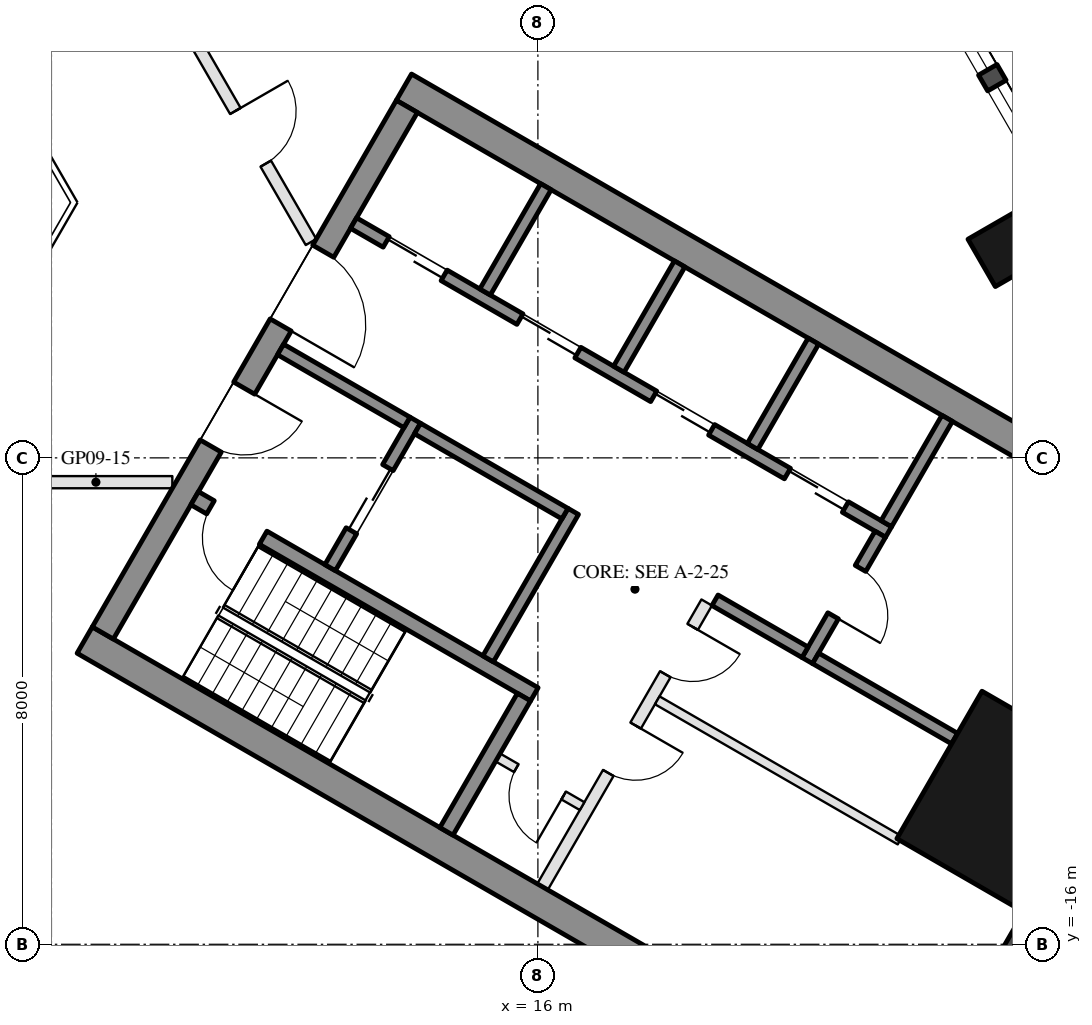
"""IFC4 building model, lengths in metres.
Left out: names, types, materials, properties, quantities, classifications, styles, units other than length and angle.
Written with IfcOpenShell. Run it as: python <this file> out.ifc"""

import sys

from ifc_helpers import new_model, si_unit, direction, frame, frame_2d, origin, origin_2d, place, context, subcontext, project, spatial, rectangle, hollow_rectangle, extrude, element, fill, save


model = new_model("IFC4")
c1 = context("Model", 3, precision=1e-05, world=origin(), true_north=direction((0.0, 1.0)))
c2 = subcontext(c1, "Body", "Model", "MODEL_VIEW")
j1 = project(units=[si_unit("LENGTHUNIT", "METRE"), si_unit("PLANEANGLEUNIT", "RADIAN")], contexts=[c1])
p1 = place(None, origin())
s1 = spatial("IfcSite", under=j1, at=p1, CompositionType="ELEMENT")
p2 = place(p1, origin())
s2 = spatial("IfcBuilding", under=s1, at=p2, CompositionType="ELEMENT")
p3 = place(p2, frame((0.0, 0.0, 113.1)))
s3 = spatial("IfcBuildingStorey", under=s2, at=p3, CompositionType="ELEMENT", Elevation=113.1)
p4 = place(p3, frame((23.688, -4.568, 0.0), z_axis=(0.0, 0.0, 1.0), x_axis=(-0.5, 0.866025403784, 0.0)))
e1 = element("IfcColumn", 1, at=p4, inside=s3, PredefinedType="COLUMN", context=c2, shape_type="SweptSolid", body=[
    extrude(hollow_rectangle(XDim=0.9, YDim=0.9, WallThickness=0.04, at=origin_2d()), origin(), (0.0, 0.0, 1.0), 3.7),
])
p5 = place(p3, frame((23.643, -13.65, 0.0), z_axis=(0.0, 0.0, 1.0), x_axis=(0.5, 0.866025403784, 0.0)))
e2 = element("IfcColumn", 2, at=p5, inside=s3, PredefinedType="COLUMN", context=c2, shape_type="SweptSolid", body=[
    extrude(hollow_rectangle(XDim=2.8, YDim=2.4, WallThickness=0.07, at=origin_2d()), origin(), (0.0, 0.0, 1.0), 3.7),
])
p6 = place(p3, frame((23.427, -16.792, 0.0), z_axis=(0.0, 0.0, 1.0), x_axis=(0.500018773155, 0.866014564827, 0.0)))
e3 = element("IfcWall", 3, at=p6, inside=s3, PredefinedType="SOLIDWALL", context=c2, shape_type="SweptSolid", body=[
    extrude(rectangle(XDim=5.658, YDim=0.35, at=frame_2d((2.829, 0.0))), origin(), (0.0, 0.0, 1.0), 3.55),
])
p7 = place(p3, frame((26.257, -6.567, 0.0), z_axis=(0.0, 0.0, 1.0), x_axis=(-0.500023526245, 0.866011820475, 0.0)))
e4 = element("IfcWall", 4, at=p7, inside=s3, PredefinedType="SOLIDWALL", context=c2, shape_type="SweptSolid", body=[
    extrude(rectangle(XDim=11.816, YDim=0.35, at=frame_2d((5.908, 0.0))), origin(), (0.0, 0.0, 1.0), 3.55),
])
p8 = place(p7, frame((0.38, 0.0, 0.3)))
e5 = element("IfcOpeningElement", 5, at=p8, cuts=e4, PredefinedType="OPENING", context=c2, shape_type="SweptSolid", body=[
    extrude(rectangle(XDim=1.8, YDim=2.65, at=frame_2d((0.9, 1.325))), frame((0.0, 0.185, 0.0), z_axis=(0.0, -1.0, 0.0), x_axis=(1.0, 0.0, 0.0)), (0.0, 0.0, 1.0), 0.37),
])
p9 = place(p7, frame((7.716, 0.0, 0.0)))
e6 = element("IfcOpeningElement", 6, at=p9, cuts=e4, PredefinedType="OPENING", context=c2, shape_type="SweptSolid", body=[
    extrude(rectangle(XDim=2.4, YDim=2.4, at=frame_2d((1.2, 1.2))), frame((0.0, 0.185, 0.0), z_axis=(0.0, -1.0, 0.0), x_axis=(1.0, 0.0, 0.0)), (0.0, 0.0, 1.0), 0.37),
])
p10 = place(p7, frame((3.816, 0.0, 0.3)))
e7 = element("IfcOpeningElement", 7, at=p10, cuts=e4, PredefinedType="OPENING", context=c2, shape_type="SweptSolid", body=[
    extrude(rectangle(XDim=1.6, YDim=2.65, at=frame_2d((0.8, 1.325))), frame((0.0, 0.185, 0.0), z_axis=(0.0, -1.0, 0.0), x_axis=(1.0, 0.0, 0.0)), (0.0, 0.0, 1.0), 0.37),
])
p11 = place(p7, frame((5.716, 0.0, 0.3)))
e8 = element("IfcOpeningElement", 8, at=p11, cuts=e4, PredefinedType="OPENING", context=c2, shape_type="SweptSolid", body=[
    extrude(rectangle(XDim=1.6, YDim=2.65, at=frame_2d((0.8, 1.325))), frame((0.0, 0.185, 0.0), z_axis=(0.0, -1.0, 0.0), x_axis=(1.0, 0.0, 0.0)), (0.0, 0.0, 1.0), 0.37),
])
for number, where, z_axis, x_axis in (
    (9, (8.547, -10.997, 0.0), (0.0, 0.0, 1.0), (0.866, -0.5, 0.0)),
    (10, (13.797, -1.903, 0.0), (0.0, 0.0, 1.0), (0.866, -0.5, 0.0)),
):
    element("IfcWall", number, at=place(p3, frame(where, z_axis=z_axis, x_axis=x_axis)), inside=s3, PredefinedType="SHEAR", context=c2, shape_type="SweptSolid", body=[
        extrude(rectangle(XDim=14.837, YDim=0.5, at=frame_2d((7.418, 0.0))), origin(), (0.0, 0.0, 1.0), 3.5),
    ])
p12 = place(p3, frame((8.845, -10.88, 0.0), z_axis=(0.0, 0.0, 1.0), x_axis=(0.500004234368, 0.866022959057, 0.0)))
e11 = element("IfcWall", 11, at=p12, inside=s3, PredefinedType="SHEAR", context=c2, shape_type="SweptSolid", body=[
    extrude(rectangle(XDim=10.0, YDim=0.4, at=frame_2d((5.0, 0.0))), origin(), (0.0, 0.0, 1.0), 3.5),
])
p13 = place(p12, frame((3.55, 0.0, 0.0)))
e12 = element("IfcOpeningElement", 12, at=p13, cuts=e11, PredefinedType="OPENING", context=c2, shape_type="SweptSolid", body=[
    extrude(rectangle(XDim=1.1, YDim=2.1, at=frame_2d((0.55, 1.05))), frame((0.0, 0.21, 0.0), z_axis=(0.0, -1.0, 0.0), x_axis=(1.0, 0.0, 0.0)), (0.0, 0.0, 1.0), 0.42),
])
p14 = place(p12, frame((5.85, 0.0, 0.0)))
e13 = element("IfcOpeningElement", 13, at=p14, cuts=e11, PredefinedType="OPENING", context=c2, shape_type="SweptSolid", body=[
    extrude(rectangle(XDim=1.4, YDim=2.1, at=frame_2d((0.7, 1.05))), frame((0.0, 0.21, 0.0), z_axis=(0.0, -1.0, 0.0), x_axis=(1.0, 0.0, 0.0)), (0.0, 0.0, 1.0), 0.42),
])
p15 = place(p3, frame((10.356, -8.664, 0.0), z_axis=(0.0, 0.0, 1.0), x_axis=(0.866028629588, -0.499994412703, 0.0)))
e14 = element("IfcWall", 14, at=p15, inside=s3, PredefinedType="SHEAR", context=c2, shape_type="SweptSolid", body=[
    extrude(rectangle(XDim=6.45, YDim=0.25, at=frame_2d((3.225, 0.0))), origin(), (0.0, 0.0, 1.0), 3.5),
])
p16 = place(p15, frame((0.3, 0.0, 0.0)))
e15 = element("IfcOpeningElement", 15, at=p16, cuts=e14, PredefinedType="OPENING", context=c2, shape_type="SweptSolid", body=[
    extrude(rectangle(XDim=1.0, YDim=2.1, at=frame_2d((0.5, 1.05))), frame((0.0, 0.135, 0.0), z_axis=(0.0, -1.0, 0.0), x_axis=(1.0, 0.0, 0.0)), (0.0, 0.0, 1.0), 0.27),
])
p17 = place(p3, frame((14.496, -14.143, 0.0), z_axis=(0.0, 0.0, 1.0), x_axis=(0.500062241894, 0.865989465428, 0.0)))
e16 = element("IfcWall", 16, at=p17, inside=s3, PredefinedType="SHEAR", context=c2, shape_type="SweptSolid", body=[
    extrude(rectangle(XDim=2.55, YDim=0.25, at=frame_2d((1.275, 0.0))), origin(), (0.0, 0.0, 1.0), 3.5),
])
p18 = place(p3, frame((15.181, -11.305, 0.0), z_axis=(0.0, 0.0, 1.0), x_axis=(0.49994636267, 0.866056369097, 0.0)))
e17 = element("IfcWall", 17, at=p18, inside=s3, PredefinedType="SHEAR", context=c2, shape_type="SweptSolid", body=[
    extrude(rectangle(XDim=2.8, YDim=0.2, at=frame_2d((1.4, 0.0))), origin(), (0.0, 0.0, 1.0), 3.5),
])
p19 = place(p3, frame((12.583, -9.805, 0.0), z_axis=(0.0, 0.0, 1.0), x_axis=(0.49994636267, 0.866056369097, 0.0)))
e18 = element("IfcWall", 18, at=p19, inside=s3, PredefinedType="SHEAR", context=c2, shape_type="SweptSolid", body=[
    extrude(rectangle(XDim=2.8, YDim=0.2, at=frame_2d((1.4, 0.0))), origin(), (0.0, 0.0, 1.0), 3.5),
])
p20 = place(p19, frame((0.7, 0.0, 0.0)))
e19 = element("IfcOpeningElement", 19, at=p20, cuts=e18, PredefinedType="OPENING", context=c2, shape_type="SweptSolid", body=[
    extrude(rectangle(XDim=1.2, YDim=2.1, at=frame_2d((0.6, 1.05))), frame((0.0, 0.11, 0.0), z_axis=(0.0, -1.0, 0.0), x_axis=(1.0, 0.0, 0.0)), (0.0, 0.0, 1.0), 0.22),
])
p21 = place(p3, frame((11.768, -6.217, 0.0), z_axis=(0.0, 0.0, 1.0), x_axis=(0.866050077142, -0.499957262057, 0.0)))
e20 = element("IfcWall", 20, at=p21, inside=s3, PredefinedType="SHEAR", context=c2, shape_type="SweptSolid", body=[
    extrude(rectangle(XDim=2.4, YDim=0.2, at=frame_2d((1.2, 0.0))), origin(), (0.0, 0.0, 1.0), 3.5),
])
p22 = place(p3, frame((14.02, -7.517, 0.0), z_axis=(0.0, 0.0, 1.0), x_axis=(0.866034573852, -0.49998411664, 0.0)))
e21 = element("IfcWall", 21, at=p22, inside=s3, PredefinedType="SHEAR", context=c2, shape_type="SweptSolid", body=[
    extrude(rectangle(XDim=2.8, YDim=0.2, at=frame_2d((1.4, 0.0))), origin(), (0.0, 0.0, 1.0), 3.5),
])
p23 = place(p3, frame((12.968, -4.138, 0.0), z_axis=(0.0, 0.0, 1.0), x_axis=(0.866028328073, -0.49999493495, 0.0)))
e22 = element("IfcWall", 22, at=p23, inside=s3, PredefinedType="SHEAR", context=c2, shape_type="SweptSolid", body=[
    extrude(rectangle(XDim=10.16, YDim=0.2, at=frame_2d((5.08, 0.0))), origin(), (0.0, 0.0, 1.0), 3.5),
])
p24 = place(p23, frame((0.62, 0.0, 0.0)))
e23 = element("IfcOpeningElement", 23, at=p24, cuts=e22, PredefinedType="OPENING", context=c2, shape_type="SweptSolid", body=[
    extrude(rectangle(XDim=1.1, YDim=2.1, at=frame_2d((0.55, 1.05))), frame((0.0, 0.11, 0.0), z_axis=(0.0, -1.0, 0.0), x_axis=(1.0, 0.0, 0.0)), (0.0, 0.0, 1.0), 0.22),
])
p25 = place(p23, frame((3.16, 0.0, 0.0)))
e24 = element("IfcOpeningElement", 24, at=p25, cuts=e22, PredefinedType="OPENING", context=c2, shape_type="SweptSolid", body=[
    extrude(rectangle(XDim=1.1, YDim=2.1, at=frame_2d((0.55, 1.05))), frame((0.0, 0.11, 0.0), z_axis=(0.0, -1.0, 0.0), x_axis=(1.0, 0.0, 0.0)), (0.0, 0.0, 1.0), 0.22),
])
p26 = place(p23, frame((5.7, 0.0, 0.0)))
e25 = element("IfcOpeningElement", 25, at=p26, cuts=e22, PredefinedType="OPENING", context=c2, shape_type="SweptSolid", body=[
    extrude(rectangle(XDim=1.1, YDim=2.1, at=frame_2d((0.55, 1.05))), frame((0.0, 0.11, 0.0), z_axis=(0.0, -1.0, 0.0), x_axis=(1.0, 0.0, 0.0)), (0.0, 0.0, 1.0), 0.22),
])
p27 = place(p23, frame((8.24, 0.0, 0.0)))
e26 = element("IfcOpeningElement", 26, at=p27, cuts=e22, PredefinedType="OPENING", context=c2, shape_type="SweptSolid", body=[
    extrude(rectangle(XDim=1.1, YDim=2.1, at=frame_2d((0.55, 1.05))), frame((0.0, 0.11, 0.0), z_axis=(0.0, -1.0, 0.0), x_axis=(1.0, 0.0, 0.0)), (0.0, 0.0, 1.0), 0.22),
])
p28 = place(p3, frame((20.43, -11.333, 0.0), z_axis=(0.0, 0.0, 1.0), x_axis=(0.500001309137, 0.866024647952, 0.0)))
e27 = element("IfcWall", 27, at=p28, inside=s3, PredefinedType="SHEAR", context=c2, shape_type="SweptSolid", body=[
    extrude(rectangle(XDim=2.4, YDim=0.2, at=frame_2d((1.2, 0.0))), origin(), (0.0, 0.0, 1.0), 3.5),
])
p29 = place(p28, frame((0.85, 0.0, 0.0)))
e28 = element("IfcOpeningElement", 28, at=p29, cuts=e27, PredefinedType="OPENING", context=c2, shape_type="SweptSolid", body=[
    extrude(rectangle(XDim=0.9, YDim=2.1, at=frame_2d((0.45, 1.05))), frame((0.0, 0.11, 0.0), z_axis=(0.0, -1.0, 0.0), x_axis=(1.0, 0.0, 0.0)), (0.0, 0.0, 1.0), 0.22),
])
p30 = place(p3, frame((18.913, -10.342, 0.0), z_axis=(0.0, 0.0, 1.0), x_axis=(0.866038183914, -0.499977863513, 0.0)))
e29 = element("IfcWall", 29, at=p30, inside=s3, PredefinedType="SHEAR", context=c2, shape_type="SweptSolid", body=[
    extrude(rectangle(XDim=1.71, YDim=0.2, at=frame_2d((0.855, 0.0))), origin(), (0.0, 0.0, 1.0), 3.5),
])
for number, where, z_axis, x_axis in (
    (30, (15.131, -5.272, 0.0), (0.0, 0.0, 1.0), (0.5, 0.866, 0.0)),
    (31, (17.331, -6.542, 0.0), (0.0, 0.0, 1.0), (0.5, 0.866, 0.0)),
    (32, (19.531, -7.812, 0.0), (0.0, 0.0, 1.0), (0.5, 0.866, 0.0)),
    (33, (21.73, -9.082, 0.0), (0.0, 0.0, 1.0), (0.5, 0.866, 0.0)),
):
    element("IfcWall", number, at=place(p3, frame(where, z_axis=z_axis, x_axis=x_axis)), inside=s3, PredefinedType="SHEAR", context=c2, shape_type="SweptSolid", body=[
        extrude(rectangle(XDim=2.0, YDim=0.2, at=frame_2d((1.0, 0.0))), origin(), (0.0, 0.0, 1.0), 3.5),
    ])
p31 = place(p3, frame((20.567, -11.297, 0.0), z_axis=(0.0, 0.0, 1.0), x_axis=(0.866060851709, -0.499938597367, 0.0)))
e34 = element("IfcWall", 34, at=p31, inside=s3, PredefinedType="SHEAR", context=c2, shape_type="SweptSolid", body=[
    extrude(rectangle(XDim=2.64, YDim=0.2, at=frame_2d((1.32, 0.0))), origin(), (0.0, 0.0, 1.0), 3.5),
])
p32 = place(p3, frame((16.076, -15.055, 0.0), z_axis=(0.0, 0.0, 1.0), x_axis=(0.499995103361, 0.866028230842, 0.0)))
e35 = element("IfcWall", 35, at=p32, inside=s3, PredefinedType="PARTITIONING", context=c2, shape_type="SweptSolid", body=[
    extrude(rectangle(XDim=5.4, YDim=0.2, at=frame_2d((2.7, 0.0))), origin(), (0.0, 0.0, 1.0), 3.5),
])
p33 = place(p32, frame((2.163, 0.0, 0.0)))
e36 = element("IfcOpeningElement", 36, at=p33, cuts=e35, PredefinedType="OPENING", context=c2, shape_type="SweptSolid", body=[
    extrude(rectangle(XDim=0.9, YDim=2.1, at=frame_2d((0.45, 1.05))), frame((0.0, 0.11, 0.0), z_axis=(0.0, -1.0, 0.0), x_axis=(1.0, 0.0, 0.0)), (0.0, 0.0, 1.0), 0.22),
])
p34 = place(p32, frame((4.038, 0.0, 0.0)))
e37 = element("IfcOpeningElement", 37, at=p34, cuts=e35, PredefinedType="OPENING", context=c2, shape_type="SweptSolid", body=[
    extrude(rectangle(XDim=0.9, YDim=2.1, at=frame_2d((0.45, 1.05))), frame((0.0, 0.11, 0.0), z_axis=(0.0, -1.0, 0.0), x_axis=(1.0, 0.0, 0.0)), (0.0, 0.0, 1.0), 0.22),
])
p35 = place(p3, frame((15.342, -12.928, 0.0), z_axis=(0.0, 0.0, 1.0), x_axis=(0.865989903783, -0.500061482766, 0.0)))
e38 = element("IfcWall", 38, at=p35, inside=s3, PredefinedType="PARTITIONING", context=c2, shape_type="SweptSolid", body=[
    extrude(rectangle(XDim=1.6, YDim=0.15, at=frame_2d((0.8, 0.0))), origin(), (0.0, 0.0, 1.0), 3.5),
])
p36 = place(p35, frame((0.35, 0.0, 0.0)))
e39 = element("IfcOpeningElement", 39, at=p36, cuts=e38, PredefinedType="OPENING", context=c2, shape_type="SweptSolid", body=[
    extrude(rectangle(XDim=0.9, YDim=2.1, at=frame_2d((0.45, 1.05))), frame((0.0, 0.085, 0.0), z_axis=(0.0, -1.0, 0.0), x_axis=(1.0, 0.0, 0.0)), (0.0, 0.0, 1.0), 0.17),
])
p37 = place(p3, frame((17.963, -11.987, 0.0), z_axis=(0.0, 0.0, 1.0), x_axis=(0.865998608524, -0.500046407882, 0.0)))
e40 = element("IfcWall", 40, at=p37, inside=s3, PredefinedType="PARTITIONING", context=c2, shape_type="SweptSolid", body=[
    extrude(rectangle(XDim=4.61, YDim=0.15, at=frame_2d((2.305, 0.0))), origin(), (0.0, 0.0, 1.0), 3.5),
])
p38 = place(p3, frame((9.988, -8.4, 0.0), z_axis=(0.0, 0.0, 1.0), x_axis=(-1.0, 0.0, 0.0)))
e41 = element("IfcWall", 41, at=p38, inside=s3, PredefinedType="PARTITIONING", context=c2, shape_type="SweptSolid", body=[
    extrude(rectangle(XDim=6.285, YDim=0.2, at=frame_2d((3.143, 0.0))), origin(), (0.0, 0.0, 1.0), 2.95),
])
p39 = place(p38, frame((2.642, 0.0, 0.0)))
e42 = element("IfcOpeningElement", 42, at=p39, cuts=e41, PredefinedType="OPENING", context=c2, shape_type="SweptSolid", body=[
    extrude(rectangle(XDim=1.0, YDim=2.1, at=frame_2d((0.5, 1.05))), frame((0.0, 0.11, 0.0), z_axis=(0.0, -1.0, 0.0), x_axis=(1.0, 0.0, 0.0)), (0.0, 0.0, 1.0), 0.22),
])
p40 = place(p3, frame((10.281, -1.006, 0.0), z_axis=(0.0, 0.0, 1.0), x_axis=(0.499995262016, -0.866028139243, 0.0)))
e43 = element("IfcWall", 43, at=p40, inside=s3, PredefinedType="PARTITIONING", context=c2, shape_type="SweptSolid", body=[
    extrude(rectangle(XDim=3.977, YDim=0.2, at=frame_2d((1.988, 0.0))), origin(), (0.0, 0.0, 1.0), 2.95),
])
p41 = place(p40, frame((1.488, 0.0, 0.0)))
e44 = element("IfcOpeningElement", 44, at=p41, cuts=e43, PredefinedType="OPENING", context=c2, shape_type="SweptSolid", body=[
    extrude(rectangle(XDim=1.0, YDim=2.1, at=frame_2d((0.5, 1.05))), frame((0.0, 0.11, 0.0), z_axis=(0.0, -1.0, 0.0), x_axis=(1.0, 0.0, 0.0)), (0.0, 0.0, 1.0), 0.22),
])
p42 = place(p10, origin())
e45 = element("IfcWindow", 45, at=p42, inside=s3, PartitioningType="SINGLE_PANEL", PredefinedType="WINDOW", context=c2, shape_type="SweptSolid", body=[
    extrude(rectangle(XDim=1.6, YDim=2.65, at=frame_2d((0.8, 1.325))), frame((0.0, 0.03, 0.0), z_axis=(0.0, -1.0, 0.0), x_axis=(1.0, 0.0, 0.0)), (0.0, 0.0, 1.0), 0.06),
])
fill(e7, e45)
p43 = place(p11, origin())
e46 = element("IfcWindow", 46, at=p43, inside=s3, PartitioningType="SINGLE_PANEL", PredefinedType="WINDOW", context=c2, shape_type="SweptSolid", body=[
    extrude(rectangle(XDim=1.6, YDim=2.65, at=frame_2d((0.8, 1.325))), frame((0.0, 0.03, 0.0), z_axis=(0.0, -1.0, 0.0), x_axis=(1.0, 0.0, 0.0)), (0.0, 0.0, 1.0), 0.06),
])
fill(e8, e46)
p44 = place(p20, origin())
e47 = element("IfcDoor", 47, at=p44, inside=s3, OperationType="DOUBLE_DOOR_SLIDING", PredefinedType="DOOR", context=c2, shape_type="SweptSolid", body=[
    extrude(rectangle(XDim=1.2, YDim=2.1, at=frame_2d((0.6, 1.05))), frame((0.0, 0.025, 0.0), z_axis=(0.0, -1.0, 0.0), x_axis=(1.0, 0.0, 0.0)), (0.0, 0.0, 1.0), 0.05),
])
fill(e19, e47)
p45 = place(p36, frame((0.9, 0.0, 0.0), z_axis=(0.0, 0.0, 1.0), x_axis=(-1.0, 0.0, 0.0)))
e48 = element("IfcDoor", 48, at=p45, inside=s3, OperationType="SINGLE_SWING_LEFT", PredefinedType="DOOR", context=c2, shape_type="SweptSolid", body=[
    extrude(rectangle(XDim=0.9, YDim=2.1, at=frame_2d((0.45, 1.05))), frame((0.0, 0.025, 0.0), z_axis=(0.0, -1.0, 0.0), x_axis=(1.0, 0.0, 0.0)), (0.0, 0.0, 1.0), 0.05),
])
fill(e39, e48)
p46 = place(p24, origin())
e49 = element("IfcDoor", 49, at=p46, inside=s3, OperationType="DOUBLE_DOOR_SLIDING", PredefinedType="DOOR", context=c2, shape_type="SweptSolid", body=[
    extrude(rectangle(XDim=1.1, YDim=2.1, at=frame_2d((0.55, 1.05))), frame((0.0, 0.025, 0.0), z_axis=(0.0, -1.0, 0.0), x_axis=(1.0, 0.0, 0.0)), (0.0, 0.0, 1.0), 0.05),
])
fill(e23, e49)
p47 = place(p25, origin())
e50 = element("IfcDoor", 50, at=p47, inside=s3, OperationType="DOUBLE_DOOR_SLIDING", PredefinedType="DOOR", context=c2, shape_type="SweptSolid", body=[
    extrude(rectangle(XDim=1.1, YDim=2.1, at=frame_2d((0.55, 1.05))), frame((0.0, 0.025, 0.0), z_axis=(0.0, -1.0, 0.0), x_axis=(1.0, 0.0, 0.0)), (0.0, 0.0, 1.0), 0.05),
])
fill(e24, e50)
p48 = place(p26, origin())
e51 = element("IfcDoor", 51, at=p48, inside=s3, OperationType="DOUBLE_DOOR_SLIDING", PredefinedType="DOOR", context=c2, shape_type="SweptSolid", body=[
    extrude(rectangle(XDim=1.1, YDim=2.1, at=frame_2d((0.55, 1.05))), frame((0.0, 0.025, 0.0), z_axis=(0.0, -1.0, 0.0), x_axis=(1.0, 0.0, 0.0)), (0.0, 0.0, 1.0), 0.05),
])
fill(e25, e51)
p49 = place(p27, origin())
e52 = element("IfcDoor", 52, at=p49, inside=s3, OperationType="DOUBLE_DOOR_SLIDING", PredefinedType="DOOR", context=c2, shape_type="SweptSolid", body=[
    extrude(rectangle(XDim=1.1, YDim=2.1, at=frame_2d((0.55, 1.05))), frame((0.0, 0.025, 0.0), z_axis=(0.0, -1.0, 0.0), x_axis=(1.0, 0.0, 0.0)), (0.0, 0.0, 1.0), 0.05),
])
fill(e26, e52)
p50 = place(p29, frame((0.9, 0.0, 0.0), z_axis=(0.0, 0.0, 1.0), x_axis=(-1.0, 0.0, 0.0)))
e53 = element("IfcDoor", 53, at=p50, inside=s3, OperationType="SINGLE_SWING_RIGHT", PredefinedType="DOOR", context=c2, shape_type="SweptSolid", body=[
    extrude(rectangle(XDim=0.9, YDim=2.1, at=frame_2d((0.45, 1.05))), frame((0.0, 0.025, 0.0), z_axis=(0.0, -1.0, 0.0), x_axis=(1.0, 0.0, 0.0)), (0.0, 0.0, 1.0), 0.05),
])
fill(e28, e53)
p51 = place(p33, frame((0.9, 0.0, 0.0), z_axis=(0.0, 0.0, 1.0), x_axis=(-1.0, 0.0, 0.0)))
e54 = element("IfcDoor", 54, at=p51, inside=s3, OperationType="SINGLE_SWING_LEFT", PredefinedType="DOOR", context=c2, shape_type="SweptSolid", body=[
    extrude(rectangle(XDim=0.9, YDim=2.1, at=frame_2d((0.45, 1.05))), frame((0.0, 0.025, 0.0), z_axis=(0.0, -1.0, 0.0), x_axis=(1.0, 0.0, 0.0)), (0.0, 0.0, 1.0), 0.05),
])
fill(e36, e54)
p52 = place(p34, frame((0.9, 0.0, 0.0), z_axis=(0.0, 0.0, 1.0), x_axis=(-1.0, 0.0, 0.0)))
e55 = element("IfcDoor", 55, at=p52, inside=s3, OperationType="SINGLE_SWING_LEFT", PredefinedType="DOOR", context=c2, shape_type="SweptSolid", body=[
    extrude(rectangle(XDim=0.9, YDim=2.1, at=frame_2d((0.45, 1.05))), frame((0.0, 0.025, 0.0), z_axis=(0.0, -1.0, 0.0), x_axis=(1.0, 0.0, 0.0)), (0.0, 0.0, 1.0), 0.05),
])
fill(e37, e55)
p53 = place(p13, frame((1.1, 0.0, 0.0), z_axis=(0.0, 0.0, 1.0), x_axis=(-1.0, 0.0, 0.0)))
e56 = element("IfcDoor", 56, at=p53, inside=s3, OperationType="SINGLE_SWING_LEFT", PredefinedType="DOOR", context=c2, shape_type="SweptSolid", body=[
    extrude(rectangle(XDim=1.1, YDim=2.1, at=frame_2d((0.55, 1.05))), frame((0.0, 0.025, 0.0), z_axis=(0.0, -1.0, 0.0), x_axis=(1.0, 0.0, 0.0)), (0.0, 0.0, 1.0), 0.05),
])
fill(e12, e56)
p54 = place(p14, frame((1.4, 0.0, 0.0), z_axis=(0.0, 0.0, 1.0), x_axis=(-1.0, 0.0, 0.0)))
e57 = element("IfcDoor", 57, at=p54, inside=s3, OperationType="DOUBLE_DOOR_SINGLE_SWING", PredefinedType="DOOR", context=c2, shape_type="SweptSolid", body=[
    extrude(rectangle(XDim=1.4, YDim=2.1, at=frame_2d((0.7, 1.05))), frame((0.0, 0.025, 0.0), z_axis=(0.0, -1.0, 0.0), x_axis=(1.0, 0.0, 0.0)), (0.0, 0.0, 1.0), 0.05),
])
fill(e13, e57)
p55 = place(p16, frame((1.0, 0.0, 0.0), z_axis=(0.0, 0.0, 1.0), x_axis=(-1.0, 0.0, 0.0)))
e58 = element("IfcDoor", 58, at=p55, inside=s3, OperationType="SINGLE_SWING_LEFT", PredefinedType="DOOR", context=c2, shape_type="SweptSolid", body=[
    extrude(rectangle(XDim=1.0, YDim=2.1, at=frame_2d((0.5, 1.05))), frame((0.0, 0.025, 0.0), z_axis=(0.0, -1.0, 0.0), x_axis=(1.0, 0.0, 0.0)), (0.0, 0.0, 1.0), 0.05),
])
fill(e15, e58)
p56 = place(p41, origin())
e59 = element("IfcDoor", 59, at=p56, inside=s3, OperationType="SINGLE_SWING_LEFT", PredefinedType="DOOR", context=c2, shape_type="SweptSolid", body=[
    extrude(rectangle(XDim=1.0, YDim=2.1, at=frame_2d((0.5, 1.05))), frame((0.0, 0.025, 0.0), z_axis=(0.0, -1.0, 0.0), x_axis=(1.0, 0.0, 0.0)), (0.0, 0.0, 1.0), 0.05),
])
fill(e44, e59)
save(model, sys.argv[1])
